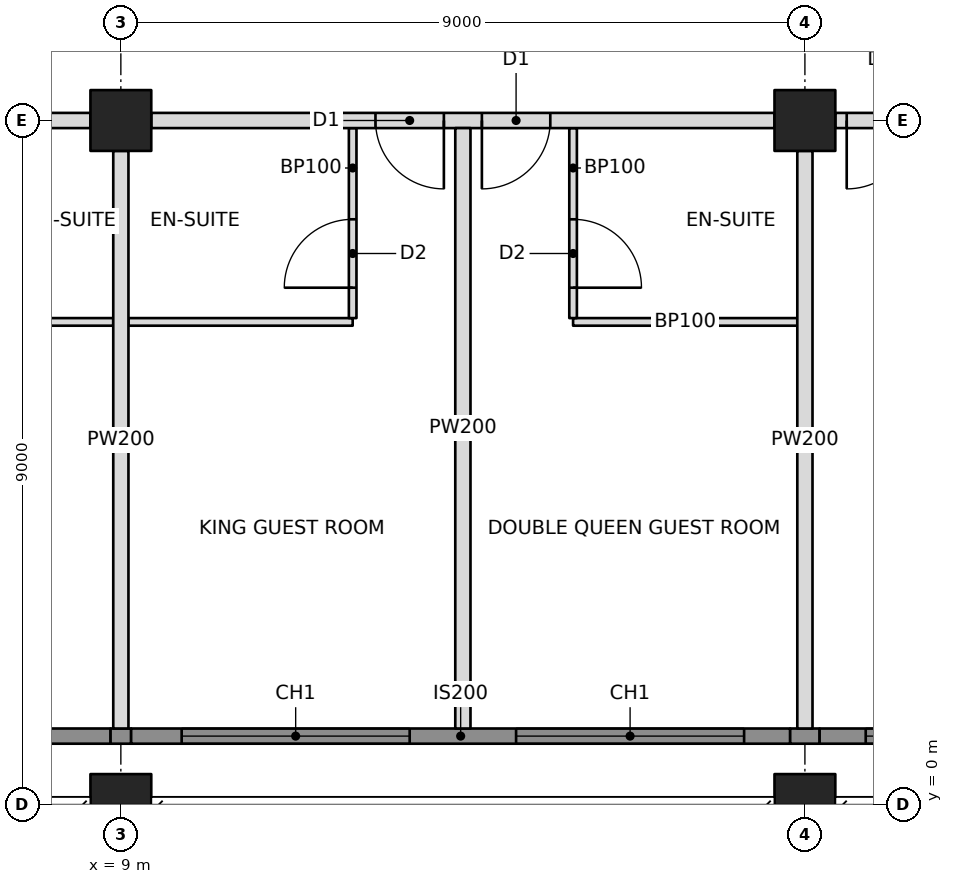
"""IFC4 building model, lengths in metres.
Left out: names, types, materials, properties, quantities, classifications, styles, units other than length and angle.
Written with IfcOpenShell. Run it as: python <this file> out.ifc"""

import sys

from ifc_helpers import new_model, si_unit, direction, frame, frame_2d, origin, origin_2d, place, context, subcontext, project, spatial, rectangle, hollow_rectangle, extrude, element, fill, save


model = new_model("IFC4")
c1 = context("Model", 3, precision=1e-05, world=origin(), true_north=direction((0.0, 1.0)))
c2 = subcontext(c1, "Body", "Model", "MODEL_VIEW")
j1 = project(units=[si_unit("LENGTHUNIT", "METRE"), si_unit("PLANEANGLEUNIT", "RADIAN")], contexts=[c1])
p1 = place(None, origin())
s1 = spatial("IfcSite", under=j1, at=p1, CompositionType="ELEMENT")
p2 = place(p1, origin())
s2 = spatial("IfcBuilding", under=s1, at=p2, CompositionType="ELEMENT")
p3 = place(p2, frame((0.0, 0.0, 187.6)))
s3 = spatial("IfcBuildingStorey", under=s2, at=p3, CompositionType="ELEMENT", Elevation=187.6)
p4 = place(p3, frame((9.0, 0.0, 0.0), z_axis=(0.0, 0.0, 1.0), x_axis=(1.0, 0.0, 0.0)))
e1 = element("IfcColumn", 1, at=p4, inside=s3, PredefinedType="COLUMN", context=c2, shape_type="SweptSolid", body=[
    extrude(hollow_rectangle(XDim=0.8, YDim=0.8, WallThickness=0.07, at=origin_2d()), origin(), (0.0, 0.0, 1.0), 3.4),
])
p5 = place(p3, frame((9.0, 9.0, 0.0), z_axis=(0.0, 0.0, 1.0), x_axis=(1.0, 0.0, 0.0)))
e2 = element("IfcColumn", 2, at=p5, inside=s3, PredefinedType="COLUMN", context=c2, shape_type="SweptSolid", body=[
    extrude(hollow_rectangle(XDim=0.8, YDim=0.8, WallThickness=0.06, at=origin_2d()), origin(), (0.0, 0.0, 1.0), 3.4),
])
p6 = place(p3, frame((18.0, 0.0, 0.0), z_axis=(0.0, 0.0, 1.0), x_axis=(1.0, 0.0, 0.0)))
e3 = element("IfcColumn", 3, at=p6, inside=s3, PredefinedType="COLUMN", context=c2, shape_type="SweptSolid", body=[
    extrude(hollow_rectangle(XDim=0.8, YDim=0.8, WallThickness=0.07, at=origin_2d()), origin(), (0.0, 0.0, 1.0), 3.4),
])
p7 = place(p3, frame((18.0, 9.0, 0.0), z_axis=(0.0, 0.0, 1.0), x_axis=(1.0, 0.0, 0.0)))
e4 = element("IfcColumn", 4, at=p7, inside=s3, PredefinedType="COLUMN", context=c2, shape_type="SweptSolid", body=[
    extrude(hollow_rectangle(XDim=0.8, YDim=0.8, WallThickness=0.06, at=origin_2d()), origin(), (0.0, 0.0, 1.0), 3.4),
])
p8 = place(p3, frame((3.0, 0.9, 0.0), z_axis=(0.0, 0.0, 1.0), x_axis=(1.0, 0.0, 0.0)))
e5 = element("IfcWall", 5, at=p8, inside=s3, PredefinedType="SOLIDWALL", context=c2, shape_type="SweptSolid", body=[
    extrude(rectangle(XDim=5.865, YDim=0.2, at=frame_2d((2.932, 0.0))), origin(), (0.0, 0.0, 1.0), 3.2),
])
p9 = place(p8, frame((1.45, 0.0, 0.6)))
e6 = element("IfcOpeningElement", 6, at=p9, cuts=e5, PredefinedType="OPENING", context=c2, shape_type="SweptSolid", body=[
    extrude(rectangle(XDim=3.0, YDim=2.2, at=frame_2d((1.5, 1.1))), frame((0.0, 0.11, 0.0), z_axis=(0.0, -1.0, 0.0), x_axis=(1.0, 0.0, 0.0)), (0.0, 0.0, 1.0), 0.22),
])
p10 = place(p3, frame((1.0, 9.0, 0.0), z_axis=(0.0, 0.0, 1.0), x_axis=(1.0, 0.0, 0.0)))
e7 = element("IfcWall", 7, at=p10, inside=s3, PredefinedType="PARTITIONING", context=c2, shape_type="SweptSolid", body=[
    extrude(rectangle(XDim=7.6, YDim=0.2, at=frame_2d((3.8, 0.0))), origin(), (0.0, 0.0, 1.0), 2.438),
])
p11 = place(p10, frame((0.25, 0.0, 0.0)))
e8 = element("IfcOpeningElement", 8, at=p11, cuts=e7, PredefinedType="OPENING", context=c2, shape_type="SweptSolid", body=[
    extrude(rectangle(XDim=0.9, YDim=2.1, at=frame_2d((0.45, 1.05))), frame((0.0, 0.11, 0.0), z_axis=(0.0, -1.0, 0.0), x_axis=(1.0, 0.0, 0.0)), (0.0, 0.0, 1.0), 0.22),
])
p12 = place(p3, frame((9.4, 9.0, 0.0), z_axis=(0.0, 0.0, 1.0), x_axis=(1.0, 0.0, 0.0)))
e9 = element("IfcWall", 9, at=p12, inside=s3, PredefinedType="PARTITIONING", context=c2, shape_type="SweptSolid", body=[
    extrude(rectangle(XDim=8.2, YDim=0.2, at=frame_2d((4.1, 0.0))), origin(), (0.0, 0.0, 1.0), 2.405),
])
p13 = place(p12, frame((2.95, 0.0, 0.0)))
e10 = element("IfcOpeningElement", 10, at=p13, cuts=e9, PredefinedType="OPENING", context=c2, shape_type="SweptSolid", body=[
    extrude(rectangle(XDim=0.9, YDim=2.1, at=frame_2d((0.45, 1.05))), frame((0.0, 0.11, 0.0), z_axis=(0.0, -1.0, 0.0), x_axis=(1.0, 0.0, 0.0)), (0.0, 0.0, 1.0), 0.22),
])
p14 = place(p12, frame((4.35, 0.0, 0.0)))
e11 = element("IfcOpeningElement", 11, at=p14, cuts=e9, PredefinedType="OPENING", context=c2, shape_type="SweptSolid", body=[
    extrude(rectangle(XDim=0.9, YDim=2.1, at=frame_2d((0.45, 1.05))), frame((0.0, 0.11, 0.0), z_axis=(0.0, -1.0, 0.0), x_axis=(1.0, 0.0, 0.0)), (0.0, 0.0, 1.0), 0.22),
])
p15 = place(p3, frame((18.4, 9.0, 0.0), z_axis=(0.0, 0.0, 1.0), x_axis=(1.0, 0.0, 0.0)))
e12 = element("IfcWall", 12, at=p15, inside=s3, PredefinedType="PARTITIONING", context=c2, shape_type="SweptSolid", body=[
    extrude(rectangle(XDim=8.2, YDim=0.2, at=frame_2d((4.1, 0.0))), origin(), (0.0, 0.0, 1.0), 2.405),
])
p16 = place(p15, frame((0.15, 0.0, 0.0)))
e13 = element("IfcOpeningElement", 13, at=p16, cuts=e12, PredefinedType="OPENING", context=c2, shape_type="SweptSolid", body=[
    extrude(rectangle(XDim=0.9, YDim=2.1, at=frame_2d((0.45, 1.05))), frame((0.0, 0.11, 0.0), z_axis=(0.0, -1.0, 0.0), x_axis=(1.0, 0.0, 0.0)), (0.0, 0.0, 1.0), 0.22),
])
p17 = place(p3, frame((9.0, 8.6, 0.0), z_axis=(0.0, 0.0, 1.0), x_axis=(0.0, -1.0, 0.0)))
e14 = element("IfcWall", 14, at=p17, inside=s3, PredefinedType="PARTITIONING", context=c2, shape_type="SweptSolid", body=[
    extrude(rectangle(XDim=7.6, YDim=0.2, at=frame_2d((3.8, 0.0))), origin(), (0.0, 0.0, 1.0), 2.438),
])
p18 = place(p3, frame((13.5, 8.9, 0.0), z_axis=(0.0, 0.0, 1.0), x_axis=(0.0, -1.0, 0.0)))
e15 = element("IfcWall", 15, at=p18, inside=s3, PredefinedType="PARTITIONING", context=c2, shape_type="SweptSolid", body=[
    extrude(rectangle(XDim=7.9, YDim=0.2, at=frame_2d((3.95, 0.0))), origin(), (0.0, 0.0, 1.0), 2.404),
])
p19 = place(p3, frame((18.0, 8.6, 0.0), z_axis=(0.0, 0.0, 1.0), x_axis=(0.0, -1.0, 0.0)))
e16 = element("IfcWall", 16, at=p19, inside=s3, PredefinedType="PARTITIONING", context=c2, shape_type="SweptSolid", body=[
    extrude(rectangle(XDim=7.6, YDim=0.2, at=frame_2d((3.8, 0.0))), origin(), (0.0, 0.0, 1.0), 2.405),
])
p20 = place(p3, frame((5.45, 6.35, 0.0), z_axis=(0.0, 0.0, 1.0), x_axis=(1.0, 0.0, 0.0)))
e17 = element("IfcWall", 17, at=p20, inside=s3, PredefinedType="PARTITIONING", context=c2, shape_type="SweptSolid", body=[
    extrude(rectangle(XDim=3.45, YDim=0.1, at=frame_2d((1.725, 0.0))), origin(), (0.0, 0.0, 1.0), 2.438),
])
p21 = place(p3, frame((9.1, 6.35, 0.0), z_axis=(0.0, 0.0, 1.0), x_axis=(1.0, 0.0, 0.0)))
e18 = element("IfcWall", 18, at=p21, inside=s3, PredefinedType="PARTITIONING", context=c2, shape_type="SweptSolid", body=[
    extrude(rectangle(XDim=2.95, YDim=0.1, at=frame_2d((1.475, 0.0))), origin(), (0.0, 0.0, 1.0), 2.438),
])
p22 = place(p3, frame((12.05, 8.9, 0.0), z_axis=(0.0, 0.0, 1.0), x_axis=(0.0, -1.0, 0.0)))
e19 = element("IfcWall", 19, at=p22, inside=s3, PredefinedType="PARTITIONING", context=c2, shape_type="SweptSolid", body=[
    extrude(rectangle(XDim=2.5, YDim=0.1, at=frame_2d((1.25, 0.0))), origin(), (0.0, 0.0, 1.0), 2.404),
])
p23 = place(p22, frame((1.2, 0.0, 0.0)))
e20 = element("IfcOpeningElement", 20, at=p23, cuts=e19, PredefinedType="OPENING", context=c2, shape_type="SweptSolid", body=[
    extrude(rectangle(XDim=0.9, YDim=2.1, at=frame_2d((0.45, 1.05))), frame((0.0, 0.06, 0.0), z_axis=(0.0, -1.0, 0.0), x_axis=(1.0, 0.0, 0.0)), (0.0, 0.0, 1.0), 0.12),
])
p24 = place(p3, frame((14.95, 6.35, 0.0), z_axis=(0.0, 0.0, 1.0), x_axis=(1.0, 0.0, 0.0)))
e21 = element("IfcWall", 21, at=p24, inside=s3, PredefinedType="PARTITIONING", context=c2, shape_type="SweptSolid", body=[
    extrude(rectangle(XDim=2.95, YDim=0.1, at=frame_2d((1.475, 0.0))), origin(), (0.0, 0.0, 1.0), 2.404),
])
p25 = place(p3, frame((14.95, 8.9, 0.0), z_axis=(0.0, 0.0, 1.0), x_axis=(0.0, -1.0, 0.0)))
e22 = element("IfcWall", 22, at=p25, inside=s3, PredefinedType="PARTITIONING", context=c2, shape_type="SweptSolid", body=[
    extrude(rectangle(XDim=2.5, YDim=0.1, at=frame_2d((1.25, 0.0))), origin(), (0.0, 0.0, 1.0), 2.404),
])
p26 = place(p25, frame((1.2, 0.0, 0.0)))
e23 = element("IfcOpeningElement", 23, at=p26, cuts=e22, PredefinedType="OPENING", context=c2, shape_type="SweptSolid", body=[
    extrude(rectangle(XDim=0.9, YDim=2.1, at=frame_2d((0.45, 1.05))), frame((0.0, 0.06, 0.0), z_axis=(0.0, -1.0, 0.0), x_axis=(1.0, 0.0, 0.0)), (0.0, 0.0, 1.0), 0.12),
])
p27 = place(p3, frame((8.865, 0.9, 0.0), z_axis=(0.0, 0.0, 1.0), x_axis=(1.0, 0.0, 0.0)))
e24 = element("IfcWall", 24, at=p27, inside=s3, PredefinedType="SOLIDWALL", context=c2, shape_type="SweptSolid", body=[
    extrude(rectangle(XDim=0.271, YDim=0.2, at=frame_2d((0.135, 0.0))), origin(), (0.0, 0.0, 1.0), 2.438),
])
p28 = place(p3, frame((9.135, 0.9, 0.0), z_axis=(0.0, 0.0, 1.0), x_axis=(1.0, 0.0, 0.0)))
e25 = element("IfcWall", 25, at=p28, inside=s3, PredefinedType="SOLIDWALL", context=c2, shape_type="SweptSolid", body=[
    extrude(rectangle(XDim=8.671, YDim=0.2, at=frame_2d((4.335, 0.0))), origin(), (0.0, 0.0, 1.0), 3.2),
])
p29 = place(p28, frame((0.665, 0.0, 0.6)))
e26 = element("IfcOpeningElement", 26, at=p29, cuts=e25, PredefinedType="OPENING", context=c2, shape_type="SweptSolid", body=[
    extrude(rectangle(XDim=3.0, YDim=2.2, at=frame_2d((1.5, 1.1))), frame((0.0, 0.11, 0.0), z_axis=(0.0, -1.0, 0.0), x_axis=(1.0, 0.0, 0.0)), (0.0, 0.0, 1.0), 0.22),
])
p30 = place(p28, frame((5.065, 0.0, 0.6)))
e27 = element("IfcOpeningElement", 27, at=p30, cuts=e25, PredefinedType="OPENING", context=c2, shape_type="SweptSolid", body=[
    extrude(rectangle(XDim=3.0, YDim=2.2, at=frame_2d((1.5, 1.1))), frame((0.0, 0.11, 0.0), z_axis=(0.0, -1.0, 0.0), x_axis=(1.0, 0.0, 0.0)), (0.0, 0.0, 1.0), 0.22),
])
p31 = place(p3, frame((17.806, 0.9, 0.0), z_axis=(0.0, 0.0, 1.0), x_axis=(1.0, 0.0, 0.0)))
e28 = element("IfcWall", 28, at=p31, inside=s3, PredefinedType="SOLIDWALL", context=c2, shape_type="SweptSolid", body=[
    extrude(rectangle(XDim=0.388, YDim=0.2, at=frame_2d((0.194, 0.0))), origin(), (0.0, 0.0, 1.0), 2.404),
])
p32 = place(p3, frame((18.194, 0.9, 0.0), z_axis=(0.0, 0.0, 1.0), x_axis=(1.0, 0.0, 0.0)))
e29 = element("IfcWall", 29, at=p32, inside=s3, PredefinedType="SOLIDWALL", context=c2, shape_type="SweptSolid", body=[
    extrude(rectangle(XDim=8.612, YDim=0.2, at=frame_2d((4.306, 0.0))), origin(), (0.0, 0.0, 1.0), 3.2),
])
p33 = place(p32, frame((0.606, 0.0, 0.6)))
e30 = element("IfcOpeningElement", 30, at=p33, cuts=e29, PredefinedType="OPENING", context=c2, shape_type="SweptSolid", body=[
    extrude(rectangle(XDim=3.0, YDim=2.2, at=frame_2d((1.5, 1.1))), frame((0.0, 0.11, 0.0), z_axis=(0.0, -1.0, 0.0), x_axis=(1.0, 0.0, 0.0)), (0.0, 0.0, 1.0), 0.22),
])
p34 = place(p32, frame((5.006, 0.0, 0.6)))
e31 = element("IfcOpeningElement", 31, at=p34, cuts=e29, PredefinedType="OPENING", context=c2, shape_type="SweptSolid", body=[
    extrude(rectangle(XDim=3.0, YDim=2.2, at=frame_2d((1.5, 1.1))), frame((0.0, 0.11, 0.0), z_axis=(0.0, -1.0, 0.0), x_axis=(1.0, 0.0, 0.0)), (0.0, 0.0, 1.0), 0.22),
])
p35 = place(p29, origin())
e32 = element("IfcWindow", 32, at=p35, inside=s3, PartitioningType="TRIPLE_PANEL_VERTICAL", PredefinedType="WINDOW", context=c2, shape_type="SweptSolid", body=[
    extrude(rectangle(XDim=3.0, YDim=2.2, at=frame_2d((1.5, 1.1))), frame((0.0, 0.03, 0.0), z_axis=(0.0, -1.0, 0.0), x_axis=(1.0, 0.0, 0.0)), (0.0, 0.0, 1.0), 0.06),
])
fill(e26, e32)
p36 = place(p30, origin())
e33 = element("IfcWindow", 33, at=p36, inside=s3, PartitioningType="TRIPLE_PANEL_VERTICAL", PredefinedType="WINDOW", context=c2, shape_type="SweptSolid", body=[
    extrude(rectangle(XDim=3.0, YDim=2.2, at=frame_2d((1.5, 1.1))), frame((0.0, 0.03, 0.0), z_axis=(0.0, -1.0, 0.0), x_axis=(1.0, 0.0, 0.0)), (0.0, 0.0, 1.0), 0.06),
])
fill(e27, e33)
p37 = place(p33, origin())
e34 = element("IfcWindow", 34, at=p37, inside=s3, PartitioningType="TRIPLE_PANEL_VERTICAL", PredefinedType="WINDOW", context=c2, shape_type="SweptSolid", body=[
    extrude(rectangle(XDim=3.0, YDim=2.2, at=frame_2d((1.5, 1.1))), frame((0.0, 0.03, 0.0), z_axis=(0.0, -1.0, 0.0), x_axis=(1.0, 0.0, 0.0)), (0.0, 0.0, 1.0), 0.06),
])
fill(e30, e34)
p38 = place(p23, frame((0.9, 0.0, 0.0), z_axis=(0.0, 0.0, 1.0), x_axis=(-1.0, 0.0, 0.0)))
e35 = element("IfcDoor", 35, at=p38, inside=s3, OperationType="SINGLE_SWING_LEFT", PredefinedType="DOOR", context=c2, shape_type="SweptSolid", body=[
    extrude(rectangle(XDim=0.9, YDim=2.1, at=frame_2d((0.45, 1.05))), frame((0.0, 0.025, 0.0), z_axis=(0.0, -1.0, 0.0), x_axis=(1.0, 0.0, 0.0)), (0.0, 0.0, 1.0), 0.05),
])
fill(e20, e35)
p39 = place(p13, frame((0.9, 0.0, 0.0), z_axis=(0.0, 0.0, 1.0), x_axis=(-1.0, 0.0, 0.0)))
e36 = element("IfcDoor", 36, at=p39, inside=s3, OperationType="SINGLE_SWING_LEFT", PredefinedType="DOOR", context=c2, shape_type="SweptSolid", body=[
    extrude(rectangle(XDim=0.9, YDim=2.1, at=frame_2d((0.45, 1.05))), frame((0.0, 0.025, 0.0), z_axis=(0.0, -1.0, 0.0), x_axis=(1.0, 0.0, 0.0)), (0.0, 0.0, 1.0), 0.05),
])
fill(e10, e36)
p40 = place(p26, origin())
e37 = element("IfcDoor", 37, at=p40, inside=s3, OperationType="SINGLE_SWING_RIGHT", PredefinedType="DOOR", context=c2, shape_type="SweptSolid", body=[
    extrude(rectangle(XDim=0.9, YDim=2.1, at=frame_2d((0.45, 1.05))), frame((0.0, 0.025, 0.0), z_axis=(0.0, -1.0, 0.0), x_axis=(1.0, 0.0, 0.0)), (0.0, 0.0, 1.0), 0.05),
])
fill(e23, e37)
p41 = place(p14, frame((0.9, 0.0, 0.0), z_axis=(0.0, 0.0, 1.0), x_axis=(-1.0, 0.0, 0.0)))
e38 = element("IfcDoor", 38, at=p41, inside=s3, OperationType="SINGLE_SWING_RIGHT", PredefinedType="DOOR", context=c2, shape_type="SweptSolid", body=[
    extrude(rectangle(XDim=0.9, YDim=2.1, at=frame_2d((0.45, 1.05))), frame((0.0, 0.025, 0.0), z_axis=(0.0, -1.0, 0.0), x_axis=(1.0, 0.0, 0.0)), (0.0, 0.0, 1.0), 0.05),
])
fill(e11, e38)
p42 = place(p16, frame((0.9, 0.0, 0.0), z_axis=(0.0, 0.0, 1.0), x_axis=(-1.0, 0.0, 0.0)))
e39 = element("IfcDoor", 39, at=p42, inside=s3, OperationType="SINGLE_SWING_RIGHT", PredefinedType="DOOR", context=c2, shape_type="SweptSolid", body=[
    extrude(rectangle(XDim=0.9, YDim=2.1, at=frame_2d((0.45, 1.05))), frame((0.0, 0.025, 0.0), z_axis=(0.0, -1.0, 0.0), x_axis=(1.0, 0.0, 0.0)), (0.0, 0.0, 1.0), 0.05),
])
fill(e13, e39)
save(model, sys.argv[1])
